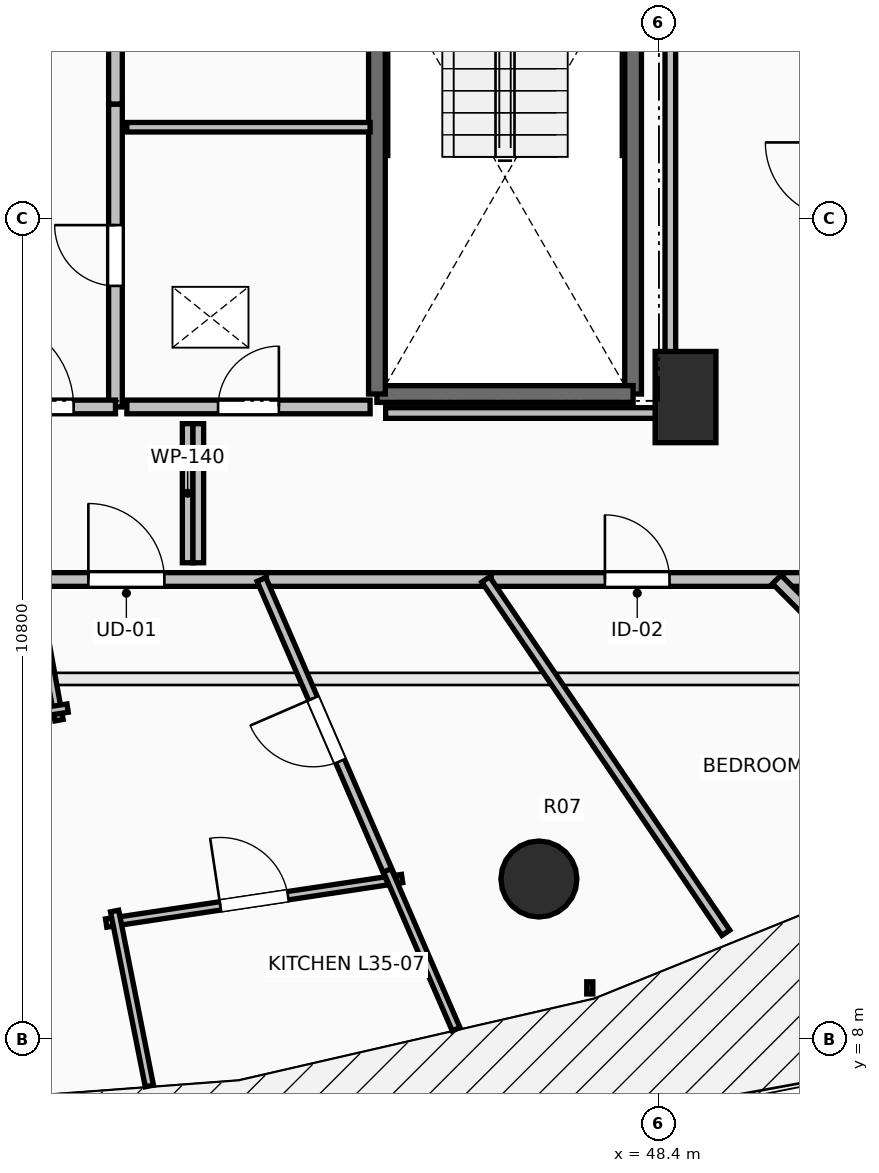
"""IFC4 building model, lengths in metres.
Left out: names, types, materials, properties, quantities, classifications, styles, units other than length and angle.
Written with IfcOpenShell. Run it as: python <this file> out.ifc"""

import sys

from ifc_helpers import new_model, si_unit, direction, frame, frame_2d, origin, origin_2d, place, context, subcontext, project, spatial, rectangle, circle, extrude, element, fill, save


model = new_model("IFC4")
c1 = context("Model", 3, precision=1e-05, world=origin(), true_north=direction((0.0, 1.0)))
c2 = subcontext(c1, "Body", "Model", "MODEL_VIEW")
j1 = project(units=[si_unit("LENGTHUNIT", "METRE"), si_unit("PLANEANGLEUNIT", "RADIAN")], contexts=[c1])
p1 = place(None, origin())
s1 = spatial("IfcSite", under=j1, at=p1, CompositionType="ELEMENT")
p2 = place(p1, origin())
s2 = spatial("IfcBuilding", under=s1, at=p2, CompositionType="ELEMENT")
p3 = place(p2, frame((0.0, 0.0, 132.6)))
s3 = spatial("IfcBuildingStorey", under=s2, at=p3, CompositionType="ELEMENT", Elevation=132.6)
p4 = place(p3, frame((46.821, 10.109, 0.0), z_axis=(0.0, 0.0, 1.0), x_axis=(0.382683432365, -0.923879532511, 0.0)))
e1 = element("IfcColumn", 1, at=p4, inside=s3, PredefinedType="COLUMN", context=c2, shape_type="SweptSolid", body=[
    extrude(circle(Radius=0.5, at=origin_2d()), origin(), (0.0, 0.0, 1.0), 3.5),
])
p5 = place(p3, frame((48.75, 16.45, 0.0), z_axis=(0.0, 0.0, 1.0), x_axis=(1.0, 0.0, 0.0)))
e2 = element("IfcColumn", 2, at=p5, inside=s3, PredefinedType="PILASTER", context=c2, shape_type="SweptSolid", body=[
    extrude(rectangle(XDim=0.8, YDim=1.2, at=origin_2d()), origin(), (0.0, 0.0, 1.0), 3.5),
])
p6 = place(p3, frame((48.06, 23.91, 0.0), z_axis=(0.0, 0.0, 1.0), x_axis=(0.0, -1.0, 0.0)))
e3 = element("IfcWall", 3, at=p6, inside=s3, PredefinedType="SOLIDWALL", context=c2, shape_type="SweptSolid", body=[
    extrude(rectangle(XDim=7.42, YDim=0.22, at=frame_2d((3.71, 0.0))), origin(), (0.0, 0.0, 1.0), 3.24),
])
p7 = place(p3, frame((48.06, 16.49, 0.0), z_axis=(0.0, 0.0, 1.0), x_axis=(-1.0, 0.0, 0.0)))
e4 = element("IfcWall", 4, at=p7, inside=s3, PredefinedType="SOLIDWALL", context=c2, shape_type="SweptSolid", body=[
    extrude(rectangle(XDim=3.37, YDim=0.22, at=frame_2d((1.685, 0.0))), origin(), (0.0, 0.0, 1.0), 3.24),
])
p8 = place(p3, frame((44.69, 16.49, 0.0), z_axis=(0.0, 0.0, 1.0), x_axis=(0.0, 1.0, 0.0)))
e5 = element("IfcWall", 5, at=p8, inside=s3, PredefinedType="SOLIDWALL", context=c2, shape_type="SweptSolid", body=[
    extrude(rectangle(XDim=7.42, YDim=0.22, at=frame_2d((3.71, 0.0))), origin(), (0.0, 0.0, 1.0), 3.24),
])
p9 = place(p3, frame((41.25, 16.32, 0.0), z_axis=(0.0, 0.0, 1.0), x_axis=(0.0, 1.0, 0.0)))
e6 = element("IfcWall", 6, at=p9, inside=s3, PredefinedType="PARTITIONING", context=c2, shape_type="SweptSolid", body=[
    extrude(rectangle(XDim=3.985, YDim=0.18, at=frame_2d((1.992, 0.0))), origin(), (0.0, 0.0, 1.0), 3.24),
])
p10 = place(p9, frame((1.593, 0.0, 0.0)))
e7 = element("IfcOpeningElement", 7, at=p10, cuts=e6, PredefinedType="OPENING", context=c2, shape_type="SweptSolid", body=[
    extrude(rectangle(XDim=0.8, YDim=2.05, at=frame_2d((0.4, 1.025))), frame((0.0, 0.105, 0.0), z_axis=(0.0, -1.0, 0.0), x_axis=(1.0, 0.0, 0.0)), (0.0, 0.0, 1.0), 0.21),
])
p11 = place(p3, frame((41.25, 20.305, 0.0), z_axis=(0.0, 0.0, 1.0), x_axis=(0.0, 1.0, 0.0)))
e8 = element("IfcWall", 8, at=p11, inside=s3, PredefinedType="PARTITIONING", context=c2, shape_type="SweptSolid", body=[
    extrude(rectangle(XDim=3.895, YDim=0.18, at=frame_2d((1.948, 0.0))), origin(), (0.0, 0.0, 1.0), 3.24),
])
p12 = place(p11, frame((1.448, 0.0, 0.0)))
e9 = element("IfcOpeningElement", 9, at=p12, cuts=e8, PredefinedType="OPENING", context=c2, shape_type="SweptSolid", body=[
    extrude(rectangle(XDim=1.0, YDim=2.15, at=frame_2d((0.5, 1.075))), frame((0.0, 0.105, 0.0), z_axis=(0.0, -1.0, 0.0), x_axis=(1.0, 0.0, 0.0)), (0.0, 0.0, 1.0), 0.21),
])
p13 = place(p3, frame((38.95, 16.32, 0.0), z_axis=(0.0, 0.0, 1.0), x_axis=(1.0, 0.0, 0.0)))
e10 = element("IfcWall", 10, at=p13, inside=s3, PredefinedType="PARTITIONING", context=c2, shape_type="SweptSolid", body=[
    extrude(rectangle(XDim=2.3, YDim=0.18, at=frame_2d((1.15, 0.0))), origin(), (0.0, 0.0, 1.0), 3.24),
])
p14 = place(p13, frame((0.55, 0.0, 0.0)))
e11 = element("IfcOpeningElement", 11, at=p14, cuts=e10, PredefinedType="OPENING", context=c2, shape_type="SweptSolid", body=[
    extrude(rectangle(XDim=1.2, YDim=2.15, at=frame_2d((0.6, 1.075))), frame((0.0, 0.105, 0.0), z_axis=(0.0, -1.0, 0.0), x_axis=(1.0, 0.0, 0.0)), (0.0, 0.0, 1.0), 0.21),
])
p15 = place(p3, frame((44.6, 20.0, 0.0), z_axis=(0.0, 0.0, 1.0), x_axis=(-1.0, 0.0, 0.0)))
e12 = element("IfcWall", 12, at=p15, inside=s3, PredefinedType="PARTITIONING", context=c2, shape_type="SweptSolid", body=[
    extrude(rectangle(XDim=3.2, YDim=0.125, at=frame_2d((1.6, 0.0))), origin(), (0.0, 0.0, 1.0), 3.24),
])
p16 = place(p3, frame((41.4, 16.32, 0.0), z_axis=(0.0, 0.0, 1.0), x_axis=(1.0, 0.0, 0.0)))
e13 = element("IfcWall", 13, at=p16, inside=s3, PredefinedType="PARTITIONING", context=c2, shape_type="SweptSolid", body=[
    extrude(rectangle(XDim=3.2, YDim=0.18, at=frame_2d((1.6, 0.0))), origin(), (0.0, 0.0, 1.0), 3.24),
])
p17 = place(p16, frame((1.2, 0.0, 0.0)))
e14 = element("IfcOpeningElement", 14, at=p17, cuts=e13, PredefinedType="OPENING", context=c2, shape_type="SweptSolid", body=[
    extrude(rectangle(XDim=0.8, YDim=2.05, at=frame_2d((0.4, 1.025))), frame((0.0, 0.105, 0.0), z_axis=(0.0, -1.0, 0.0), x_axis=(1.0, 0.0, 0.0)), (0.0, 0.0, 1.0), 0.21),
])
p18 = place(p3, frame((40.111, 14.05, 0.0), z_axis=(0.0, 0.0, 1.0), x_axis=(1.0, 0.0, 0.0)))
e15 = element("IfcWall", 15, at=p18, inside=s3, PredefinedType="PARTITIONING", context=c2, shape_type="SweptSolid", body=[
    extrude(rectangle(XDim=3.125, YDim=0.18, at=frame_2d((1.562, 0.0))), origin(), (0.0, 0.0, 1.0), 3.24),
])
p19 = place(p18, frame((0.782, 0.0, 0.0)))
e16 = element("IfcOpeningElement", 16, at=p19, cuts=e15, PredefinedType="OPENING", context=c2, shape_type="SweptSolid", body=[
    extrude(rectangle(XDim=1.0, YDim=2.15, at=frame_2d((0.5, 1.075))), frame((0.0, 0.105, 0.0), z_axis=(0.0, -1.0, 0.0), x_axis=(1.0, 0.0, 0.0)), (0.0, 0.0, 1.0), 0.21),
])
p20 = place(p3, frame((43.236, 14.05, 0.0), z_axis=(0.0, 0.0, 1.0), x_axis=(1.0, 0.0, 0.0)))
e17 = element("IfcWall", 17, at=p20, inside=s3, PredefinedType="PARTITIONING", context=c2, shape_type="SweptSolid", body=[
    extrude(rectangle(XDim=2.958, YDim=0.18, at=frame_2d((1.479, 0.0))), origin(), (0.0, 0.0, 1.0), 2.432),
])
p21 = place(p3, frame((46.194, 14.05, 0.0), z_axis=(0.0, 0.0, 1.0), x_axis=(1.0, 0.0, 0.0)))
e18 = element("IfcWall", 18, at=p21, inside=s3, PredefinedType="PARTITIONING", context=c2, shape_type="SweptSolid", body=[
    extrude(rectangle(XDim=3.841, YDim=0.18, at=frame_2d((1.92, 0.0))), origin(), (0.0, 0.0, 1.0), 2.432),
])
p22 = place(p21, frame((1.496, 0.0, 0.0)))
e19 = element("IfcOpeningElement", 19, at=p22, cuts=e18, PredefinedType="OPENING", context=c2, shape_type="SweptSolid", body=[
    extrude(rectangle(XDim=0.85, YDim=2.1, at=frame_2d((0.425, 1.05))), frame((0.0, 0.105, 0.0), z_axis=(0.0, -1.0, 0.0), x_axis=(1.0, 0.0, 0.0)), (0.0, 0.0, 1.0), 0.21),
])
p23 = place(p3, frame((50.035, 14.05, 0.0), z_axis=(0.0, 0.0, 1.0), x_axis=(1.0, 0.0, 0.0)))
e20 = element("IfcWall", 20, at=p23, inside=s3, PredefinedType="PARTITIONING", context=c2, shape_type="SweptSolid", body=[
    extrude(rectangle(XDim=0.765, YDim=0.18, at=frame_2d((0.383, 0.0))), origin(), (0.0, 0.0, 1.0), 2.874),
])
p24 = place(p3, frame((40.146, 14.188, 0.0), z_axis=(0.0, 0.0, 1.0), x_axis=(0.178662196449, -0.983910473346, 0.0)))
e21 = element("IfcWall", 21, at=p24, inside=s3, PredefinedType="PARTITIONING", context=c2, shape_type="SweptSolid", body=[
    extrude(rectangle(XDim=2.021, YDim=0.11, at=frame_2d((1.01, 0.0))), origin(), (0.0, 0.0, 1.0), 2.922),
])
p25 = place(p3, frame((40.62, 12.358, 0.0), z_axis=(0.0, 0.0, 1.0), x_axis=(-0.988884941862, -0.148682789046, 0.0)))
e22 = element("IfcWall", 22, at=p25, inside=s3, PredefinedType="PARTITIONING", context=c2, shape_type="SweptSolid", body=[
    extrude(rectangle(XDim=2.79, YDim=0.11, at=frame_2d((1.395, 0.0))), origin(), (0.0, 0.0, 1.0), 3.24),
])
p26 = place(p25, frame((0.97, 0.0, 0.0)))
e23 = element("IfcOpeningElement", 23, at=p26, cuts=e22, PredefinedType="OPENING", context=c2, shape_type="SweptSolid", body=[
    extrude(rectangle(XDim=0.85, YDim=2.1, at=frame_2d((0.425, 1.05))), frame((0.0, 0.07, 0.0), z_axis=(0.0, -1.0, 0.0), x_axis=(1.0, 0.0, 0.0)), (0.0, 0.0, 1.0), 0.14),
])
p27 = place(p3, frame((41.128, 9.53, 0.0), z_axis=(0.0, 0.0, 1.0), x_axis=(0.988884902331, 0.148683051965, 0.0)))
e24 = element("IfcWall", 24, at=p27, inside=s3, PredefinedType="PARTITIONING", context=c2, shape_type="SweptSolid", body=[
    extrude(rectangle(XDim=3.938, YDim=0.11, at=frame_2d((1.969, 0.0))), origin(), (0.0, 0.0, 1.0), 3.24),
])
p28 = place(p27, frame((1.519, 0.0, 0.0)))
e25 = element("IfcOpeningElement", 25, at=p28, cuts=e24, PredefinedType="OPENING", context=c2, shape_type="SweptSolid", body=[
    extrude(rectangle(XDim=0.9, YDim=2.1, at=frame_2d((0.45, 1.05))), frame((0.0, 0.07, 0.0), z_axis=(0.0, -1.0, 0.0), x_axis=(1.0, 0.0, 0.0)), (0.0, 0.0, 1.0), 0.14),
])
p29 = place(p3, frame((41.696, 7.387, 0.0), z_axis=(0.0, 0.0, 1.0), x_axis=(-0.194975537261, 0.980808105528, 0.0)))
e26 = element("IfcWall", 26, at=p29, inside=s3, PredefinedType="PARTITIONING", context=c2, shape_type="SweptSolid", body=[
    extrude(rectangle(XDim=2.346, YDim=0.11, at=frame_2d((1.173, 0.0))), origin(), (0.0, 0.0, 1.0), 2.728),
])
p30 = place(p3, frame((44.883, 10.095, 0.0), z_axis=(0.0, 0.0, 1.0), x_axis=(-0.397273563399, 0.917700232006, 0.0)))
e27 = element("IfcWall", 27, at=p30, inside=s3, PredefinedType="PARTITIONING", context=c2, shape_type="SweptSolid", body=[
    extrude(rectangle(XDim=4.31, YDim=0.125, at=frame_2d((2.155, 0.0))), origin(), (0.0, 0.0, 1.0), 2.432),
])
p31 = place(p30, frame((1.705, 0.0, 0.0)))
e28 = element("IfcOpeningElement", 28, at=p31, cuts=e27, PredefinedType="OPENING", context=c2, shape_type="SweptSolid", body=[
    extrude(rectangle(XDim=0.9, YDim=2.1, at=frame_2d((0.45, 1.05))), frame((0.0, 0.077, 0.0), z_axis=(0.0, -1.0, 0.0), x_axis=(1.0, 0.0, 0.0)), (0.0, 0.0, 1.0), 0.155),
])
p32 = place(p3, frame((45.732, 8.134, 0.0), z_axis=(0.0, 0.0, 1.0), x_axis=(-0.397125966554, 0.91776411277, 0.0)))
e29 = element("IfcWall", 29, at=p32, inside=s3, PredefinedType="PARTITIONING", context=c2, shape_type="SweptSolid", body=[
    extrude(rectangle(XDim=2.277, YDim=0.11, at=frame_2d((1.139, 0.0))), origin(), (0.0, 0.0, 1.0), 2.728),
])
p33 = place(p3, frame((49.28, 9.402, 0.0), z_axis=(0.0, 0.0, 1.0), x_axis=(-0.562106811751, 0.827064648128, 0.0)))
e30 = element("IfcWall", 30, at=p33, inside=s3, PredefinedType="PARTITIONING", context=c2, shape_type="SweptSolid", body=[
    extrude(rectangle(XDim=5.62, YDim=0.125, at=frame_2d((2.81, 0.0))), origin(), (0.0, 0.0, 1.0), 2.432),
])
p34 = place(p3, frame((52.895, 11.105, 0.0), z_axis=(0.0, 0.0, 1.0), x_axis=(-0.707106781187, 0.707106781187, 0.0)))
e31 = element("IfcWall", 31, at=p34, inside=s3, PredefinedType="PARTITIONING", context=c2, shape_type="SweptSolid", body=[
    extrude(rectangle(XDim=4.165, YDim=0.16, at=frame_2d((2.083, 0.0))), origin(), (0.0, 0.0, 1.0), 2.728),
])
for number, where, z_axis, x_axis in (
    (32, (42.2, 16.1, 0.0), (0.0, 0.0, 1.0), (0.0, -1.0, 0.0)),
    (33, (42.34, 14.27, 0.0), (0.0, 0.0, 1.0), (0.0, 1.0, 0.0)),
):
    element("IfcWall", number, at=place(p3, frame(where, z_axis=z_axis, x_axis=x_axis)), inside=s3, PredefinedType="PARTITIONING", context=c2, shape_type="SweptSolid", body=[
        extrude(rectangle(XDim=1.83, YDim=0.14, at=frame_2d((0.915, 0.0))), origin(), (0.0, 0.0, 1.0), 3.24),
    ])
p35 = place(p3, frame((44.805, 16.24, 0.0), z_axis=(0.0, 0.0, 1.0), x_axis=(1.0, 0.0, 0.0)))
e34 = element("IfcWall", 34, at=p35, inside=s3, PredefinedType="PARTITIONING", context=c2, shape_type="SweptSolid", body=[
    extrude(rectangle(XDim=3.745, YDim=0.14, at=frame_2d((1.873, 0.0))), origin(), (0.0, 0.0, 1.0), 2.432),
])
p36 = place(p3, frame((48.55, 16.24, 0.0), z_axis=(0.0, 0.0, 1.0), x_axis=(0.0, 1.0, 0.0)))
e35 = element("IfcWall", 35, at=p36, inside=s3, PredefinedType="PARTITIONING", context=c2, shape_type="SweptSolid", body=[
    extrude(rectangle(XDim=7.514, YDim=0.14, at=frame_2d((3.757, 0.0))), origin(), (0.0, 0.0, 1.0), 2.432),
])
p37 = place(p10, origin())
e36 = element("IfcDoor", 36, at=p37, inside=s3, OperationType="SINGLE_SWING_RIGHT", PredefinedType="DOOR", context=c2, shape_type="SweptSolid", body=[
    extrude(rectangle(XDim=0.8, YDim=2.05, at=frame_2d((0.4, 1.025))), frame((0.0, 0.025, 0.0), z_axis=(0.0, -1.0, 0.0), x_axis=(1.0, 0.0, 0.0)), (0.0, 0.0, 1.0), 0.05),
])
fill(e7, e36)
p38 = place(p14, origin())
e37 = element("IfcDoor", 37, at=p38, inside=s3, OperationType="SINGLE_SWING_LEFT", PredefinedType="DOOR", context=c2, shape_type="SweptSolid", body=[
    extrude(rectangle(XDim=1.2, YDim=2.15, at=frame_2d((0.6, 1.075))), frame((0.0, 0.025, 0.0), z_axis=(0.0, -1.0, 0.0), x_axis=(1.0, 0.0, 0.0)), (0.0, 0.0, 1.0), 0.05),
])
fill(e11, e37)
p39 = place(p17, origin())
e38 = element("IfcDoor", 38, at=p39, inside=s3, OperationType="SINGLE_SWING_RIGHT", PredefinedType="DOOR", context=c2, shape_type="SweptSolid", body=[
    extrude(rectangle(XDim=0.8, YDim=2.05, at=frame_2d((0.4, 1.025))), frame((0.0, 0.025, 0.0), z_axis=(0.0, -1.0, 0.0), x_axis=(1.0, 0.0, 0.0)), (0.0, 0.0, 1.0), 0.05),
])
fill(e14, e38)
p40 = place(p19, origin())
e39 = element("IfcDoor", 39, at=p40, inside=s3, OperationType="SINGLE_SWING_LEFT", PredefinedType="DOOR", context=c2, shape_type="SweptSolid", body=[
    extrude(rectangle(XDim=1.0, YDim=2.15, at=frame_2d((0.5, 1.075))), frame((0.0, 0.025, 0.0), z_axis=(0.0, -1.0, 0.0), x_axis=(1.0, 0.0, 0.0)), (0.0, 0.0, 1.0), 0.05),
])
fill(e16, e39)
p41 = place(p28, origin())
e40 = element("IfcDoor", 40, at=p41, inside=s3, OperationType="SINGLE_SWING_LEFT", PredefinedType="DOOR", context=c2, shape_type="SweptSolid", body=[
    extrude(rectangle(XDim=0.9, YDim=2.1, at=frame_2d((0.45, 1.05))), frame((0.0, 0.025, 0.0), z_axis=(0.0, -1.0, 0.0), x_axis=(1.0, 0.0, 0.0)), (0.0, 0.0, 1.0), 0.05),
])
fill(e25, e40)
p42 = place(p31, origin())
e41 = element("IfcDoor", 41, at=p42, inside=s3, OperationType="SINGLE_SWING_RIGHT", PredefinedType="DOOR", context=c2, shape_type="SweptSolid", body=[
    extrude(rectangle(XDim=0.9, YDim=2.1, at=frame_2d((0.45, 1.05))), frame((0.0, 0.025, 0.0), z_axis=(0.0, -1.0, 0.0), x_axis=(1.0, 0.0, 0.0)), (0.0, 0.0, 1.0), 0.05),
])
fill(e28, e41)
p43 = place(p22, origin())
e42 = element("IfcDoor", 42, at=p43, inside=s3, OperationType="SINGLE_SWING_LEFT", PredefinedType="DOOR", context=c2, shape_type="SweptSolid", body=[
    extrude(rectangle(XDim=0.85, YDim=2.1, at=frame_2d((0.425, 1.05))), frame((0.0, 0.025, 0.0), z_axis=(0.0, -1.0, 0.0), x_axis=(1.0, 0.0, 0.0)), (0.0, 0.0, 1.0), 0.05),
])
fill(e19, e42)
save(model, sys.argv[1])
